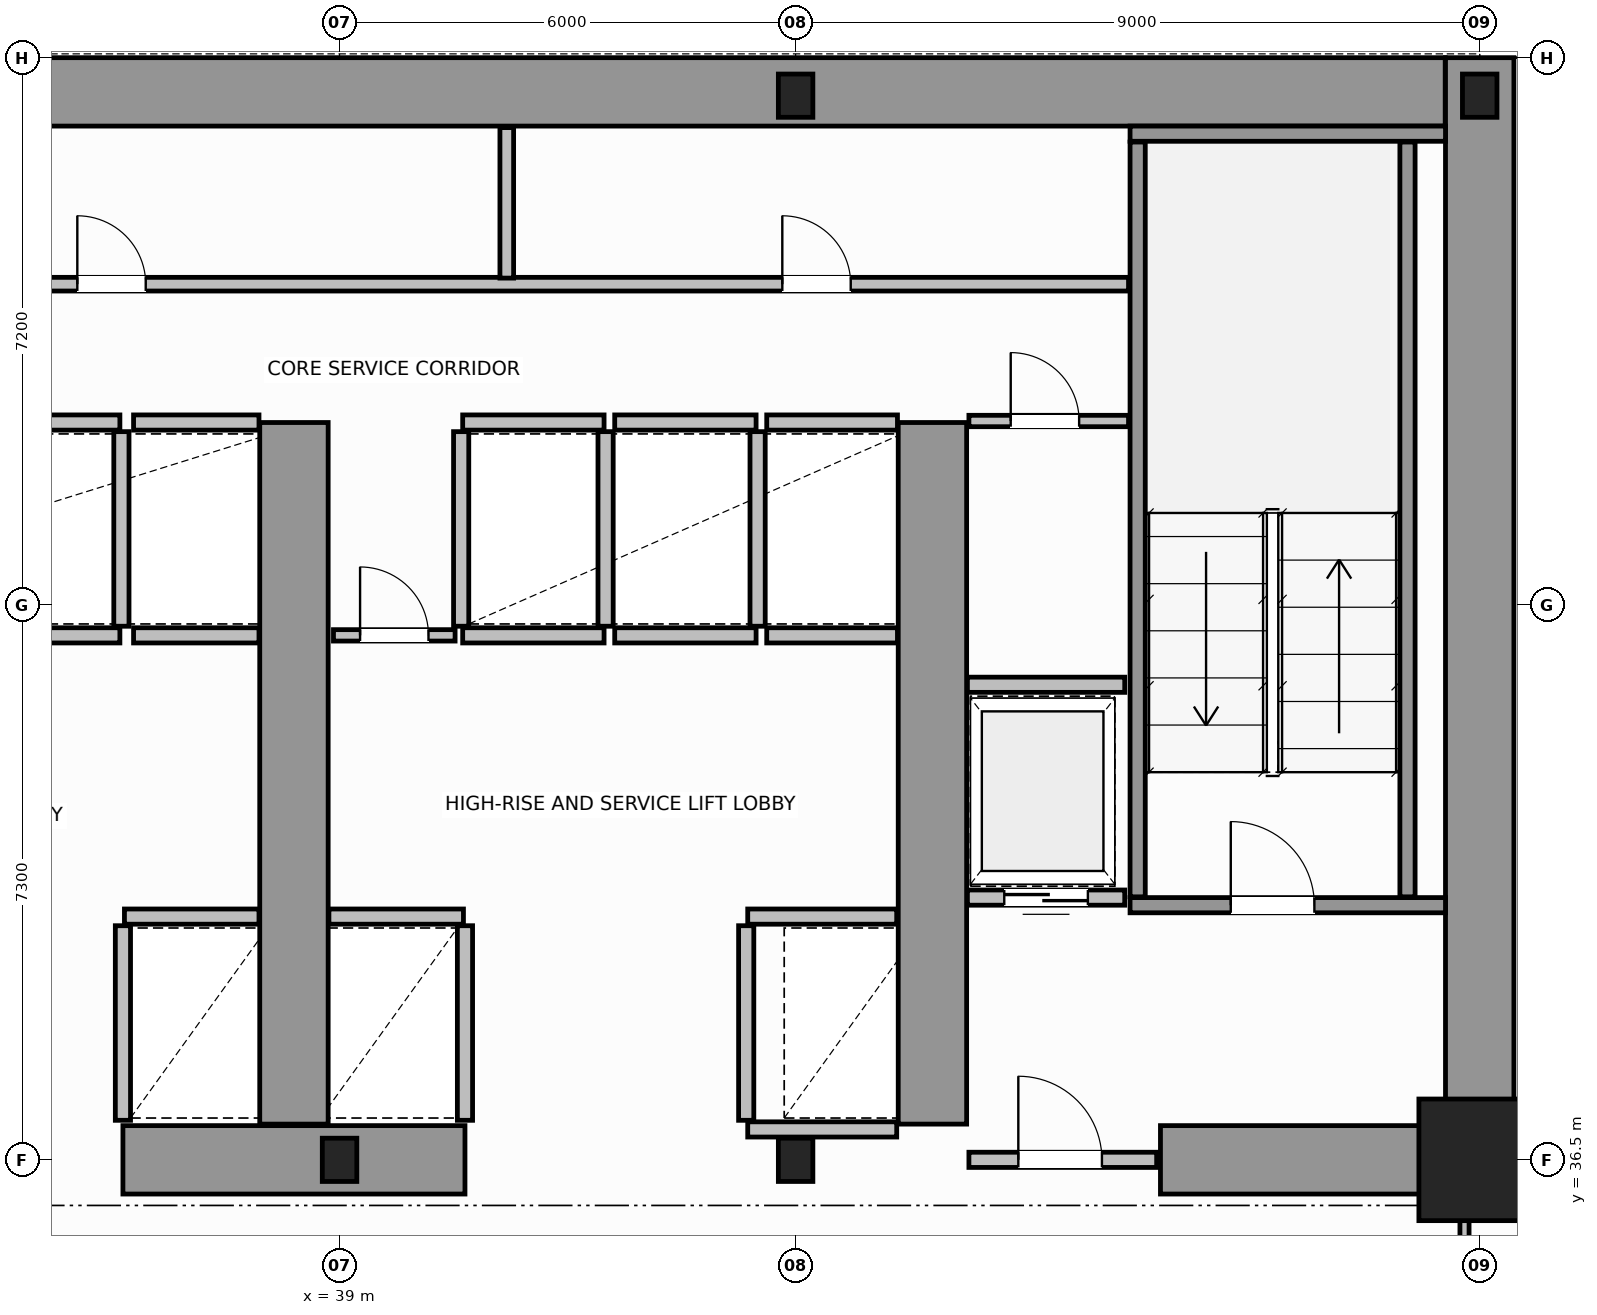
"""IFC4 building model, lengths in metres.
Left out: names, types, materials, properties, quantities, classifications, styles, units other than length and angle.
Written with IfcOpenShell. Run it as: python <this file> out.ifc"""

import sys

from ifc_helpers import new_model, si_unit, direction, frame, frame_2d, origin, origin_2d, place, context, subcontext, project, spatial, rectangle, i_section, extrude, source, transform, mapped, element, fill, save


model = new_model("IFC4")
c1 = context("Model", 3, precision=1e-05, world=origin(), true_north=direction((0.0, 1.0)))
c2 = subcontext(c1, "Body", "Model", "MODEL_VIEW")
j1 = project(units=[si_unit("LENGTHUNIT", "METRE"), si_unit("PLANEANGLEUNIT", "RADIAN")], contexts=[c1])
p1 = place(None, origin())
s1 = spatial("IfcSite", under=j1, at=p1, CompositionType="ELEMENT")
p2 = place(p1, origin())
s2 = spatial("IfcBuilding", under=s1, at=p2, CompositionType="ELEMENT")
p3 = place(p2, frame((0.0, 0.0, 22.6)))
s3 = spatial("IfcBuildingStorey", under=s2, at=p3, CompositionType="ELEMENT", Elevation=22.6)
m1 = source(origin(), c2, "Body", "SweptSolid", [
    extrude(i_section(OverallWidth=0.454, OverallDepth=0.569, WebThickness=0.078, FlangeThickness=0.08, FilletRadius=0.015, at=origin_2d()), origin(), (0.0, 0.0, 1.0), 3.8),
])
for number, where, z_axis, x_axis in (
    (1, (39.0, 36.5, 0.0), (0.0, 0.0, 1.0), (1.0, 0.0, 0.0)),
    (2, (45.0, 36.5, 0.0), (0.0, 0.0, 1.0), (1.0, 0.0, 0.0)),
):
    element("IfcColumn", number, at=place(p3, frame(where, z_axis=z_axis, x_axis=x_axis)), inside=s3, PredefinedType="COLUMN", context=c2, shape_type="MappedRepresentation", body=[
        mapped(m1, transform((0.0, 0.0, 0.0), scale=1.0)),
    ])
m2 = source(origin(), c2, "Body", "SweptSolid", [
    extrude(rectangle(XDim=1.6, YDim=1.6, at=origin_2d()), origin(), (0.0, 0.0, 1.0), 3.8),
])
p4 = place(p3, frame((54.0, 36.5, 0.0), z_axis=(0.0, 0.0, 1.0), x_axis=(1.0, 0.0, 0.0)))
e3 = element("IfcColumn", 3, at=p4, inside=s3, PredefinedType="COLUMN", context=c2, shape_type="MappedRepresentation", body=[
    mapped(m2, transform((0.0, 0.0, 0.0), scale=1.0)),
])
for number, where, z_axis, x_axis in (
    (4, (45.0, 50.5, 0.0), (0.0, 0.0, 1.0), (1.0, 0.0, 0.0)),
    (5, (54.0, 50.5, 0.0), (0.0, 0.0, 1.0), (1.0, 0.0, 0.0)),
):
    element("IfcColumn", number, at=place(p3, frame(where, z_axis=z_axis, x_axis=x_axis)), inside=s3, PredefinedType="COLUMN", context=c2, shape_type="MappedRepresentation", body=[
        mapped(m1, transform((0.0, 0.0, 0.0), scale=1.0)),
    ])
p5 = place(p3, frame((34.002, 50.55, 0.0), z_axis=(0.0, 0.0, 1.0), x_axis=(1.0, 0.0, 0.0)))
e6 = element("IfcWall", 6, at=p5, inside=s3, PredefinedType="SHEAR", context=c2, shape_type="SweptSolid", body=[
    extrude(rectangle(XDim=19.544, YDim=0.9, at=frame_2d((9.772, 0.0))), origin(), (0.0, 0.0, 1.0), 3.8),
])
p6 = place(p3, frame((54.0, 36.5, 0.0), z_axis=(0.0, 0.0, 1.0), x_axis=(0.0, 1.0, 0.0)))
e7 = element("IfcWall", 7, at=p6, inside=s3, PredefinedType="SHEAR", context=c2, shape_type="SweptSolid", body=[
    extrude(rectangle(XDim=14.5, YDim=0.9, at=frame_2d((7.25, 0.0))), origin(), (0.0, 0.0, 1.0), 3.8),
])
p7 = place(p3, frame((36.15, 36.5, 0.0), z_axis=(0.0, 0.0, 1.0), x_axis=(1.0, 0.0, 0.0)))
e8 = element("IfcWall", 8, at=p7, inside=s3, PredefinedType="SHEAR", context=c2, shape_type="SweptSolid", body=[
    extrude(rectangle(XDim=4.5, YDim=0.9, at=frame_2d((2.25, 0.0))), origin(), (0.0, 0.0, 1.0), 3.8),
])
p8 = place(p3, frame((49.8, 36.5, 0.0), z_axis=(0.0, 0.0, 1.0), x_axis=(1.0, 0.0, 0.0)))
e9 = element("IfcWall", 9, at=p8, inside=s3, PredefinedType="SHEAR", context=c2, shape_type="SweptSolid", body=[
    extrude(rectangle(XDim=3.73, YDim=0.9, at=frame_2d((1.865, 0.0))), origin(), (0.0, 0.0, 1.0), 2.38),
])
for number, where, z_axis, x_axis in (
    (10, (38.4, 36.97, 0.0), (0.0, 0.0, 1.0), (0.0, 1.0, 0.0)),
    (11, (46.8, 36.97, 0.0), (0.0, 0.0, 1.0), (0.0, 1.0, 0.0)),
):
    element("IfcWall", number, at=place(p3, frame(where, z_axis=z_axis, x_axis=x_axis)), inside=s3, PredefinedType="SHEAR", context=c2, shape_type="SweptSolid", body=[
        extrude(rectangle(XDim=9.23, YDim=0.9, at=frame_2d((4.615, 0.0))), origin(), (0.0, 0.0, 1.0), 3.8),
    ])
p9 = place(p3, frame((49.4, 39.85, 0.0), z_axis=(0.0, 0.0, 1.0), x_axis=(1.0, 0.0, 0.0)))
e12 = element("IfcWall", 12, at=p9, inside=s3, PredefinedType="SOLIDWALL", context=c2, shape_type="SweptSolid", body=[
    extrude(rectangle(XDim=4.15, YDim=0.2, at=frame_2d((2.075, 0.0))), origin(), (0.0, 0.0, 1.0), 3.8),
])
p10 = place(p9, frame((1.325, 0.0, 0.0)))
e13 = element("IfcOpeningElement", 13, at=p10, cuts=e12, PredefinedType="OPENING", context=c2, shape_type="SweptSolid", body=[
    extrude(rectangle(XDim=1.1, YDim=2.15, at=frame_2d((0.55, 1.075))), frame((0.0, 0.11, 0.0), z_axis=(0.0, -1.0, 0.0), x_axis=(1.0, 0.0, 0.0)), (0.0, 0.0, 1.0), 0.22),
])
p11 = place(p3, frame((49.4, 50.0, 0.0), z_axis=(0.0, 0.0, 1.0), x_axis=(1.0, 0.0, 0.0)))
e14 = element("IfcWall", 14, at=p11, inside=s3, PredefinedType="SOLIDWALL", context=c2, shape_type="SweptSolid", body=[
    extrude(rectangle(XDim=4.15, YDim=0.2, at=frame_2d((2.075, 0.0))), origin(), (0.0, 0.0, 1.0), 3.8),
])
for number, where, z_axis, x_axis in (
    (15, (49.5, 39.96, 0.0), (0.0, 0.0, 1.0), (0.0, 1.0, 0.0)),
    (16, (53.05, 39.96, 0.0), (0.0, 0.0, 1.0), (0.0, 1.0, 0.0)),
):
    element("IfcWall", number, at=place(p3, frame(where, z_axis=z_axis, x_axis=x_axis)), inside=s3, PredefinedType="SOLIDWALL", context=c2, shape_type="SweptSolid", body=[
        extrude(rectangle(XDim=9.93, YDim=0.2, at=frame_2d((4.965, 0.0))), origin(), (0.0, 0.0, 1.0), 3.8),
    ])
p12 = place(p3, frame((47.28, 36.5, 0.0), z_axis=(0.0, 0.0, 1.0), x_axis=(1.0, 0.0, 0.0)))
e17 = element("IfcWall", 17, at=p12, inside=s3, PredefinedType="SOLIDWALL", context=c2, shape_type="SweptSolid", body=[
    extrude(rectangle(XDim=2.47, YDim=0.2, at=frame_2d((1.235, 0.0))), origin(), (0.0, 0.0, 1.0), 2.37),
])
p13 = place(p12, frame((0.65, 0.0, 0.0)))
e18 = element("IfcOpeningElement", 18, at=p13, cuts=e17, PredefinedType="OPENING", context=c2, shape_type="SweptSolid", body=[
    extrude(rectangle(XDim=1.1, YDim=2.15, at=frame_2d((0.55, 1.075))), frame((0.0, 0.11, 0.0), z_axis=(0.0, -1.0, 0.0), x_axis=(1.0, 0.0, 0.0)), (0.0, 0.0, 1.0), 0.22),
])
p14 = place(p3, frame((36.17, 39.7, 0.0), z_axis=(0.0, 0.0, 1.0), x_axis=(1.0, 0.0, 0.0)))
e19 = element("IfcWall", 19, at=p14, inside=s3, PredefinedType="SOLIDWALL", context=c2, shape_type="SweptSolid", body=[
    extrude(rectangle(XDim=1.77, YDim=0.2, at=frame_2d((0.885, 0.0))), origin(), (0.0, 0.0, 1.0), 3.58),
])
p15 = place(p3, frame((36.15, 37.02, 0.0), z_axis=(0.0, 0.0, 1.0), x_axis=(0.0, 1.0, 0.0)))
e20 = element("IfcWall", 20, at=p15, inside=s3, PredefinedType="SOLIDWALL", context=c2, shape_type="SweptSolid", body=[
    extrude(rectangle(XDim=2.56, YDim=0.2, at=frame_2d((1.28, 0.0))), origin(), (0.0, 0.0, 1.0), 3.58),
])
for number, where, z_axis, x_axis in (
    (21, (34.19, 43.4, 0.0), (0.0, 0.0, 1.0), (1.0, 0.0, 0.0)),
    (22, (34.19, 46.2, 0.0), (0.0, 0.0, 1.0), (1.0, 0.0, 0.0)),
):
    element("IfcWall", number, at=place(p3, frame(where, z_axis=z_axis, x_axis=x_axis)), inside=s3, PredefinedType="SOLIDWALL", context=c2, shape_type="SweptSolid", body=[
        extrude(rectangle(XDim=1.92, YDim=0.2, at=frame_2d((0.96, 0.0))), origin(), (0.0, 0.0, 1.0), 3.58),
    ])
p16 = place(p3, frame((36.13, 43.52, 0.0), z_axis=(0.0, 0.0, 1.0), x_axis=(0.0, 1.0, 0.0)))
e23 = element("IfcWall", 23, at=p16, inside=s3, PredefinedType="SOLIDWALL", context=c2, shape_type="SweptSolid", body=[
    extrude(rectangle(XDim=2.56, YDim=0.2, at=frame_2d((1.28, 0.0))), origin(), (0.0, 0.0, 1.0), 3.58),
])
for number, where, z_axis, x_axis in (
    (24, (36.29, 43.4, 0.0), (0.0, 0.0, 1.0), (1.0, 0.0, 0.0)),
    (25, (36.29, 46.2, 0.0), (0.0, 0.0, 1.0), (1.0, 0.0, 0.0)),
):
    element("IfcWall", number, at=place(p3, frame(where, z_axis=z_axis, x_axis=x_axis)), inside=s3, PredefinedType="SOLIDWALL", context=c2, shape_type="SweptSolid", body=[
        extrude(rectangle(XDim=1.65, YDim=0.2, at=frame_2d((0.825, 0.0))), origin(), (0.0, 0.0, 1.0), 3.58),
    ])
p17 = place(p3, frame((38.86, 39.7, 0.0), z_axis=(0.0, 0.0, 1.0), x_axis=(1.0, 0.0, 0.0)))
e26 = element("IfcWall", 26, at=p17, inside=s3, PredefinedType="SOLIDWALL", context=c2, shape_type="SweptSolid", body=[
    extrude(rectangle(XDim=1.77, YDim=0.2, at=frame_2d((0.885, 0.0))), origin(), (0.0, 0.0, 1.0), 3.58),
])
p18 = place(p3, frame((40.65, 37.02, 0.0), z_axis=(0.0, 0.0, 1.0), x_axis=(0.0, 1.0, 0.0)))
e27 = element("IfcWall", 27, at=p18, inside=s3, PredefinedType="SOLIDWALL", context=c2, shape_type="SweptSolid", body=[
    extrude(rectangle(XDim=2.56, YDim=0.2, at=frame_2d((1.28, 0.0))), origin(), (0.0, 0.0, 1.0), 3.58),
])
p19 = place(p3, frame((44.37, 39.7, 0.0), z_axis=(0.0, 0.0, 1.0), x_axis=(1.0, 0.0, 0.0)))
e28 = element("IfcWall", 28, at=p19, inside=s3, PredefinedType="SOLIDWALL", context=c2, shape_type="SweptSolid", body=[
    extrude(rectangle(XDim=1.96, YDim=0.2, at=frame_2d((0.98, 0.0))), origin(), (0.0, 0.0, 1.0), 3.58),
])
p20 = place(p3, frame((44.37, 36.9, 0.0), z_axis=(0.0, 0.0, 1.0), x_axis=(1.0, 0.0, 0.0)))
e29 = element("IfcWall", 29, at=p20, inside=s3, PredefinedType="SOLIDWALL", context=c2, shape_type="SweptSolid", body=[
    extrude(rectangle(XDim=1.96, YDim=0.2, at=frame_2d((0.98, 0.0))), origin(), (0.0, 0.0, 1.0), 2.37),
])
p21 = place(p3, frame((44.35, 37.02, 0.0), z_axis=(0.0, 0.0, 1.0), x_axis=(0.0, 1.0, 0.0)))
e30 = element("IfcWall", 30, at=p21, inside=s3, PredefinedType="SOLIDWALL", context=c2, shape_type="SweptSolid", body=[
    extrude(rectangle(XDim=2.56, YDim=0.2, at=frame_2d((1.28, 0.0))), origin(), (0.0, 0.0, 1.0), 3.58),
])
for number, where, z_axis, x_axis in (
    (31, (40.62, 43.4, 0.0), (0.0, 0.0, 1.0), (1.0, 0.0, 0.0)),
    (32, (40.62, 46.2, 0.0), (0.0, 0.0, 1.0), (1.0, 0.0, 0.0)),
):
    element("IfcWall", number, at=place(p3, frame(where, z_axis=z_axis, x_axis=x_axis)), inside=s3, PredefinedType="SOLIDWALL", context=c2, shape_type="SweptSolid", body=[
        extrude(rectangle(XDim=1.86, YDim=0.2, at=frame_2d((0.93, 0.0))), origin(), (0.0, 0.0, 1.0), 3.58),
    ])
for number, where, z_axis, x_axis in (
    (33, (40.6, 43.52, 0.0), (0.0, 0.0, 1.0), (0.0, 1.0, 0.0)),
    (34, (42.5, 43.52, 0.0), (0.0, 0.0, 1.0), (0.0, 1.0, 0.0)),
):
    element("IfcWall", number, at=place(p3, frame(where, z_axis=z_axis, x_axis=x_axis)), inside=s3, PredefinedType="SOLIDWALL", context=c2, shape_type="SweptSolid", body=[
        extrude(rectangle(XDim=2.56, YDim=0.2, at=frame_2d((1.28, 0.0))), origin(), (0.0, 0.0, 1.0), 3.58),
    ])
for number, where, z_axis, x_axis in (
    (35, (42.62, 43.4, 0.0), (0.0, 0.0, 1.0), (1.0, 0.0, 0.0)),
    (36, (42.62, 46.2, 0.0), (0.0, 0.0, 1.0), (1.0, 0.0, 0.0)),
):
    element("IfcWall", number, at=place(p3, frame(where, z_axis=z_axis, x_axis=x_axis)), inside=s3, PredefinedType="SOLIDWALL", context=c2, shape_type="SweptSolid", body=[
        extrude(rectangle(XDim=1.86, YDim=0.2, at=frame_2d((0.93, 0.0))), origin(), (0.0, 0.0, 1.0), 3.58),
    ])
p22 = place(p3, frame((44.5, 43.52, 0.0), z_axis=(0.0, 0.0, 1.0), x_axis=(0.0, 1.0, 0.0)))
e37 = element("IfcWall", 37, at=p22, inside=s3, PredefinedType="SOLIDWALL", context=c2, shape_type="SweptSolid", body=[
    extrude(rectangle(XDim=2.56, YDim=0.2, at=frame_2d((1.28, 0.0))), origin(), (0.0, 0.0, 1.0), 3.58),
])
for number, where, z_axis, x_axis in (
    (38, (44.62, 43.4, 0.0), (0.0, 0.0, 1.0), (1.0, 0.0, 0.0)),
    (39, (44.62, 46.2, 0.0), (0.0, 0.0, 1.0), (1.0, 0.0, 0.0)),
):
    element("IfcWall", number, at=place(p3, frame(where, z_axis=z_axis, x_axis=x_axis)), inside=s3, PredefinedType="SOLIDWALL", context=c2, shape_type="SweptSolid", body=[
        extrude(rectangle(XDim=1.72, YDim=0.2, at=frame_2d((0.86, 0.0))), origin(), (0.0, 0.0, 1.0), 3.58),
    ])
p23 = place(p3, frame((47.26, 39.95, 0.0), z_axis=(0.0, 0.0, 1.0), x_axis=(1.0, 0.0, 0.0)))
e40 = element("IfcWall", 40, at=p23, inside=s3, PredefinedType="SOLIDWALL", context=c2, shape_type="SweptSolid", body=[
    extrude(rectangle(XDim=2.07, YDim=0.2, at=frame_2d((1.035, 0.0))), origin(), (0.0, 0.0, 1.0), 3.58),
])
p24 = place(p23, frame((0.485, 0.0, 0.0)))
e41 = element("IfcOpeningElement", 41, at=p24, cuts=e40, PredefinedType="OPENING", context=c2, shape_type="SweptSolid", body=[
    extrude(rectangle(XDim=1.1, YDim=2.15, at=frame_2d((0.55, 1.075))), frame((0.0, 0.11, 0.0), z_axis=(0.0, -1.0, 0.0), x_axis=(1.0, 0.0, 0.0)), (0.0, 0.0, 1.0), 0.22),
])
p25 = place(p3, frame((47.26, 42.75, 0.0), z_axis=(0.0, 0.0, 1.0), x_axis=(1.0, 0.0, 0.0)))
e42 = element("IfcWall", 42, at=p25, inside=s3, PredefinedType="SOLIDWALL", context=c2, shape_type="SweptSolid", body=[
    extrude(rectangle(XDim=2.07, YDim=0.2, at=frame_2d((1.035, 0.0))), origin(), (0.0, 0.0, 1.0), 3.58),
])
p26 = place(p3, frame((47.28, 46.22, 0.0), z_axis=(0.0, 0.0, 1.0), x_axis=(1.0, 0.0, 0.0)))
e43 = element("IfcWall", 43, at=p26, inside=s3, PredefinedType="PARTITIONING", context=c2, shape_type="SweptSolid", body=[
    extrude(rectangle(XDim=2.1, YDim=0.15, at=frame_2d((1.05, 0.0))), origin(), (0.0, 0.0, 1.0), 3.58),
])
p27 = place(p26, frame((0.55, 0.0, 0.0)))
e44 = element("IfcOpeningElement", 44, at=p27, cuts=e43, PredefinedType="OPENING", context=c2, shape_type="SweptSolid", body=[
    extrude(rectangle(XDim=0.9, YDim=2.1, at=frame_2d((0.45, 1.05))), frame((0.0, 0.085, 0.0), z_axis=(0.0, -1.0, 0.0), x_axis=(1.0, 0.0, 0.0)), (0.0, 0.0, 1.0), 0.17),
])
p28 = place(p3, frame((38.92, 43.4, 0.0), z_axis=(0.0, 0.0, 1.0), x_axis=(1.0, 0.0, 0.0)))
e45 = element("IfcWall", 45, at=p28, inside=s3, PredefinedType="PARTITIONING", context=c2, shape_type="SweptSolid", body=[
    extrude(rectangle(XDim=1.6, YDim=0.15, at=frame_2d((0.8, 0.0))), origin(), (0.0, 0.0, 1.0), 3.58),
])
p29 = place(p28, frame((0.35, 0.0, 0.0)))
e46 = element("IfcOpeningElement", 46, at=p29, cuts=e45, PredefinedType="OPENING", context=c2, shape_type="SweptSolid", body=[
    extrude(rectangle(XDim=0.9, YDim=2.1, at=frame_2d((0.45, 1.05))), frame((0.0, 0.085, 0.0), z_axis=(0.0, -1.0, 0.0), x_axis=(1.0, 0.0, 0.0)), (0.0, 0.0, 1.0), 0.17),
])
p30 = place(p3, frame((18.62, 48.02, 0.0), z_axis=(0.0, 0.0, 1.0), x_axis=(1.0, 0.0, 0.0)))
e47 = element("IfcWall", 47, at=p30, inside=s3, PredefinedType="PLUMBINGWALL", context=c2, shape_type="SweptSolid", body=[
    extrude(rectangle(XDim=30.76, YDim=0.18, at=frame_2d((15.38, 0.0))), origin(), (0.0, 0.0, 1.0), 3.58),
])
p31 = place(p30, frame((1.955, 0.0, 0.0)))
e48 = element("IfcOpeningElement", 48, at=p31, cuts=e47, PredefinedType="OPENING", context=c2, shape_type="SweptSolid", body=[
    extrude(rectangle(XDim=0.9, YDim=2.15, at=frame_2d((0.45, 1.075))), frame((0.0, 0.1, 0.0), z_axis=(0.0, -1.0, 0.0), x_axis=(1.0, 0.0, 0.0)), (0.0, 0.0, 1.0), 0.2),
])
p32 = place(p30, frame((8.03, 0.0, 0.0)))
e49 = element("IfcOpeningElement", 49, at=p32, cuts=e47, PredefinedType="OPENING", context=c2, shape_type="SweptSolid", body=[
    extrude(rectangle(XDim=0.9, YDim=2.15, at=frame_2d((0.45, 1.075))), frame((0.0, 0.1, 0.0), z_axis=(0.0, -1.0, 0.0), x_axis=(1.0, 0.0, 0.0)), (0.0, 0.0, 1.0), 0.2),
])
p33 = place(p30, frame((16.93, 0.0, 0.0)))
e50 = element("IfcOpeningElement", 50, at=p33, cuts=e47, PredefinedType="OPENING", context=c2, shape_type="SweptSolid", body=[
    extrude(rectangle(XDim=0.9, YDim=2.15, at=frame_2d((0.45, 1.075))), frame((0.0, 0.1, 0.0), z_axis=(0.0, -1.0, 0.0), x_axis=(1.0, 0.0, 0.0)), (0.0, 0.0, 1.0), 0.2),
])
p34 = place(p30, frame((26.205, 0.0, 0.0)))
e51 = element("IfcOpeningElement", 51, at=p34, cuts=e47, PredefinedType="OPENING", context=c2, shape_type="SweptSolid", body=[
    extrude(rectangle(XDim=0.9, YDim=2.15, at=frame_2d((0.45, 1.075))), frame((0.0, 0.1, 0.0), z_axis=(0.0, -1.0, 0.0), x_axis=(1.0, 0.0, 0.0)), (0.0, 0.0, 1.0), 0.2),
])
p35 = place(p3, frame((41.2, 48.1, 0.0), z_axis=(0.0, 0.0, 1.0), x_axis=(0.0, 1.0, 0.0)))
e52 = element("IfcWall", 52, at=p35, inside=s3, PredefinedType="PLUMBINGWALL", context=c2, shape_type="SweptSolid", body=[
    extrude(rectangle(XDim=1.98, YDim=0.18, at=frame_2d((0.99, 0.0))), origin(), (0.0, 0.0, 1.0), 3.58),
])
p36 = place(p3, frame((53.8, 34.16, 0.0), z_axis=(0.0, 0.0, 1.0), x_axis=(0.0, 1.0, 0.0)))
e53 = element("IfcWall", 53, at=p36, inside=s3, PredefinedType="PARTITIONING", context=c2, shape_type="SweptSolid", body=[
    extrude(rectangle(XDim=2.28, YDim=0.12, at=frame_2d((1.14, 0.0))), origin(), (0.0, 0.0, 1.0), 3.58),
])
p37 = place(p36, frame((0.3, 0.0, 0.0)))
e54 = element("IfcOpeningElement", 54, at=p37, cuts=e53, PredefinedType="OPENING", context=c2, shape_type="SweptSolid", body=[
    extrude(rectangle(XDim=0.9, YDim=2.15, at=frame_2d((0.45, 1.075))), frame((0.0, 0.07, 0.0), z_axis=(0.0, -1.0, 0.0), x_axis=(1.0, 0.0, 0.0)), (0.0, 0.0, 1.0), 0.14),
])
m3 = source(origin(), c2, "Body", "SweptSolid", [
    extrude(rectangle(XDim=1.1, YDim=2.15, at=frame_2d((0.55, 1.075))), frame((0.0, 0.025, 0.0), z_axis=(0.0, -1.0, 0.0), x_axis=(1.0, 0.0, 0.0)), (0.0, 0.0, 1.0), 0.05),
])
p38 = place(p10, origin())
e55 = element("IfcDoor", 55, at=p38, inside=s3, OperationType="SINGLE_SWING_RIGHT", PredefinedType="DOOR", context=c2, shape_type="MappedRepresentation", body=[
    mapped(m3, transform((0.0, 0.0, 0.0), scale=1.0)),
])
fill(e13, e55)
p39 = place(p13, origin())
e56 = element("IfcDoor", 56, at=p39, inside=s3, OperationType="SINGLE_SWING_LEFT", PredefinedType="DOOR", context=c2, shape_type="MappedRepresentation", body=[
    mapped(m3, transform((0.0, 0.0, 0.0), scale=1.0)),
])
fill(e18, e56)
p40 = place(p24, origin())
e57 = element("IfcDoor", 57, at=p40, inside=s3, OperationType="DOUBLE_DOOR_SLIDING", PredefinedType="DOOR", context=c2, shape_type="MappedRepresentation", body=[
    mapped(m3, transform((0.0, 0.0, 0.0), scale=1.0)),
])
fill(e41, e57)
m4 = source(origin(), c2, "Body", "SweptSolid", [
    extrude(rectangle(XDim=0.9, YDim=2.1, at=frame_2d((0.45, 1.05))), frame((0.0, 0.025, 0.0), z_axis=(0.0, -1.0, 0.0), x_axis=(1.0, 0.0, 0.0)), (0.0, 0.0, 1.0), 0.05),
])
p41 = place(p27, origin())
e58 = element("IfcDoor", 58, at=p41, inside=s3, OperationType="SINGLE_SWING_RIGHT", PredefinedType="DOOR", context=c2, shape_type="MappedRepresentation", body=[
    mapped(m4, transform((0.0, 0.0, 0.0), scale=1.0)),
])
fill(e44, e58)
p42 = place(p29, origin())
e59 = element("IfcDoor", 59, at=p42, inside=s3, OperationType="SINGLE_SWING_LEFT", PredefinedType="DOOR", context=c2, shape_type="MappedRepresentation", body=[
    mapped(m4, transform((0.0, 0.0, 0.0), scale=1.0)),
])
fill(e46, e59)
m5 = source(origin(), c2, "Body", "SweptSolid", [
    extrude(rectangle(XDim=0.9, YDim=2.15, at=frame_2d((0.45, 1.075))), frame((0.0, 0.025, 0.0), z_axis=(0.0, -1.0, 0.0), x_axis=(1.0, 0.0, 0.0)), (0.0, 0.0, 1.0), 0.05),
])
p43 = place(p33, origin())
e60 = element("IfcDoor", 60, at=p43, inside=s3, OperationType="SINGLE_SWING_LEFT", PredefinedType="DOOR", context=c2, shape_type="MappedRepresentation", body=[
    mapped(m5, transform((0.0, 0.0, 0.0), scale=1.0)),
])
fill(e50, e60)
p44 = place(p34, origin())
e61 = element("IfcDoor", 61, at=p44, inside=s3, OperationType="SINGLE_SWING_RIGHT", PredefinedType="DOOR", context=c2, shape_type="MappedRepresentation", body=[
    mapped(m5, transform((0.0, 0.0, 0.0), scale=1.0)),
])
fill(e51, e61)
save(model, sys.argv[1])
